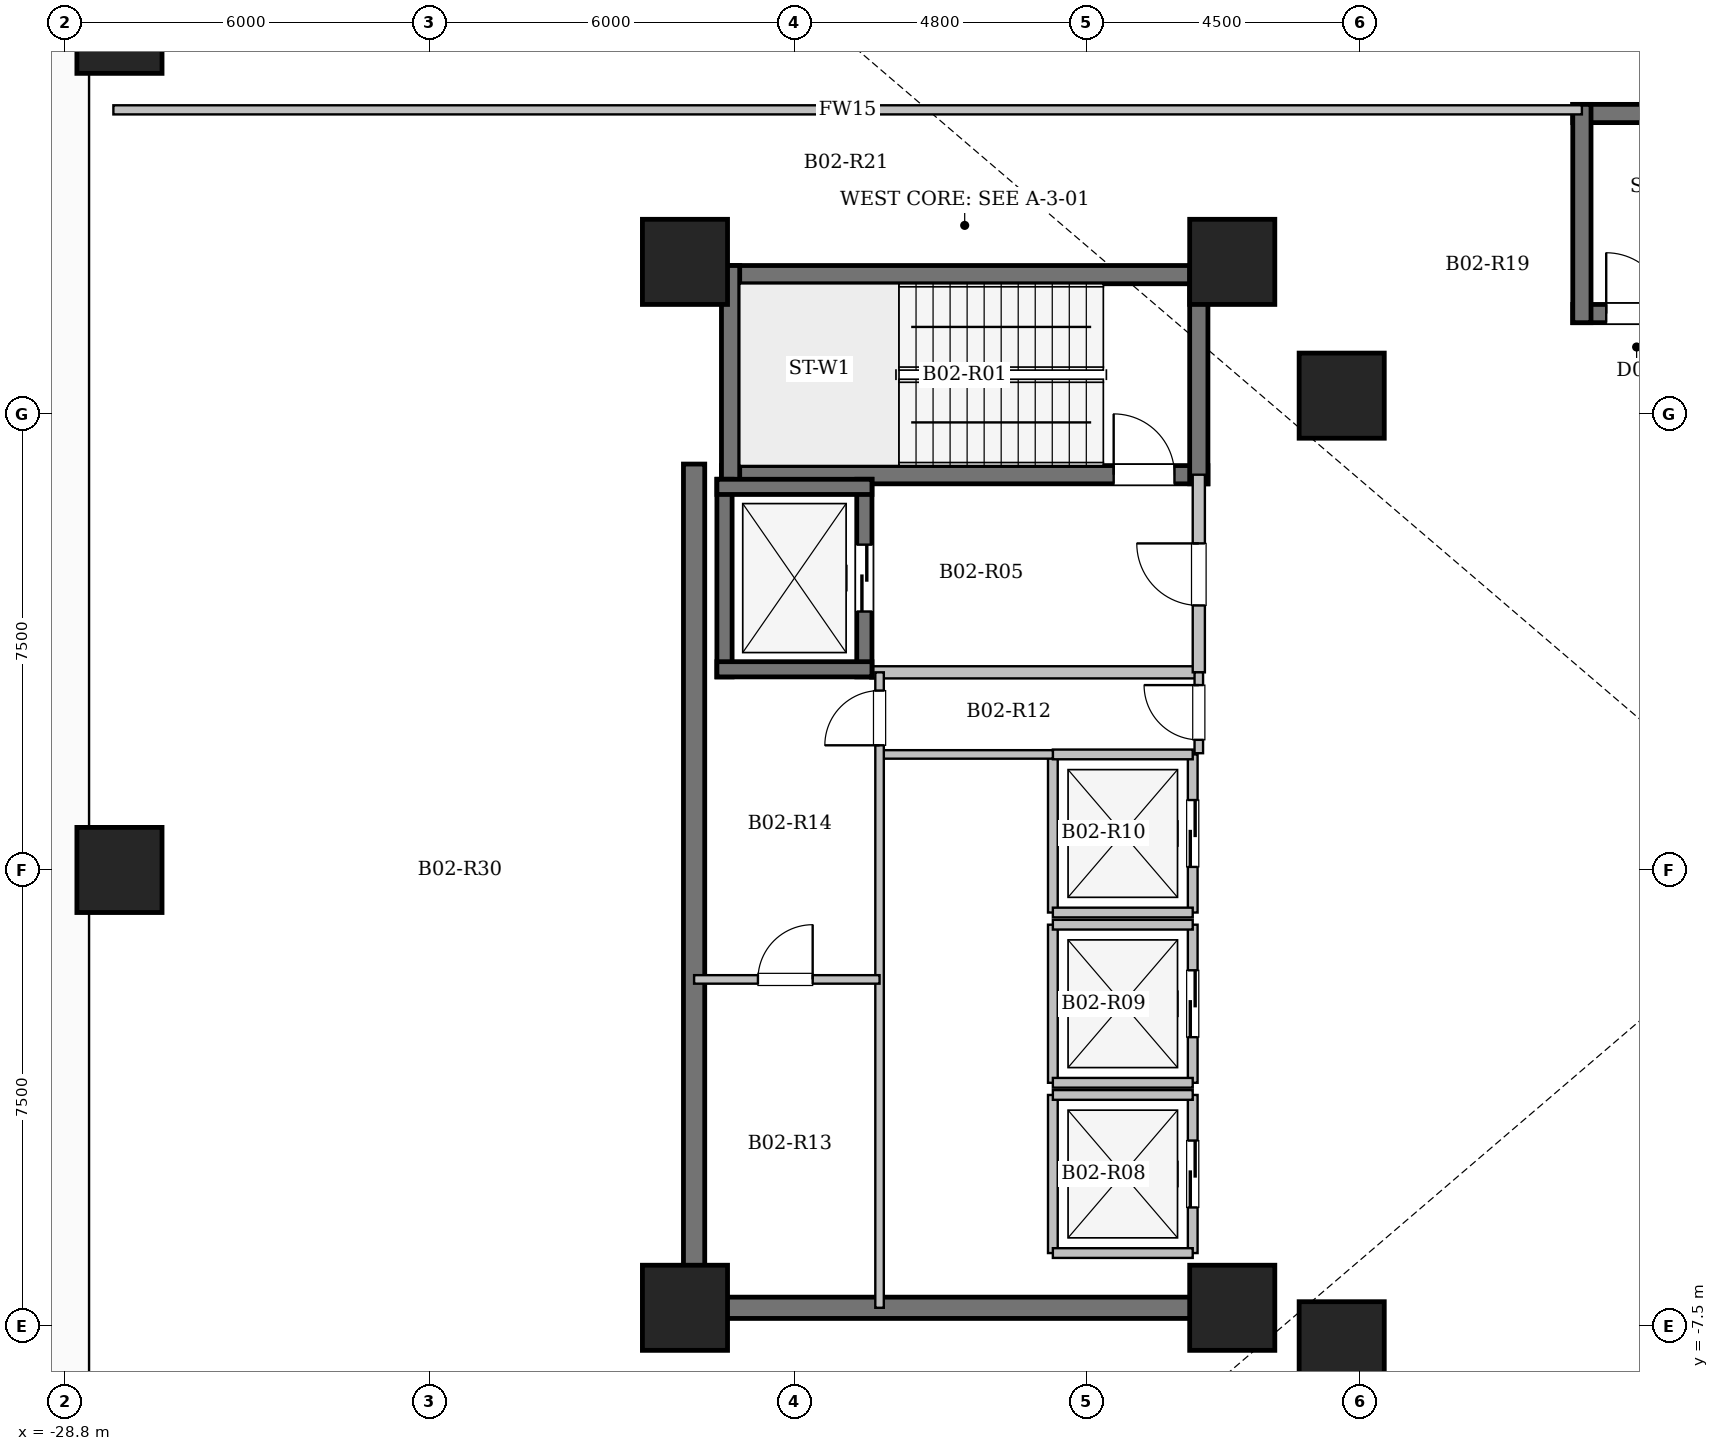
"""IFC4 building model, lengths in metres.
Left out: names, types, materials, properties, quantities, classifications, styles, units other than length and angle.
Written with IfcOpenShell. Run it as: python <this file> out.ifc"""

import sys

from ifc_helpers import new_model, si_unit, direction, frame, frame_2d, origin, origin_2d, place, context, subcontext, project, spatial, rectangle, extrude, element, fill, save


model = new_model("IFC4")
c1 = context("Model", 3, precision=1e-05, world=origin(), true_north=direction((0.0, 1.0)))
c2 = subcontext(c1, "Body", "Model", "MODEL_VIEW")
j1 = project(units=[si_unit("LENGTHUNIT", "METRE"), si_unit("PLANEANGLEUNIT", "RADIAN")], contexts=[c1])
p1 = place(None, origin())
s1 = spatial("IfcSite", under=j1, at=p1, CompositionType="ELEMENT")
p2 = place(p1, origin())
s2 = spatial("IfcBuilding", under=s1, at=p2, CompositionType="ELEMENT")
p3 = place(p2, frame((0.0, 0.0, -9.2)))
s3 = spatial("IfcBuildingStorey", under=s2, at=p3, CompositionType="ELEMENT", Elevation=-9.2)
for number, where, z_axis, x_axis in (
    (1, (-7.8, -7.8, 0.0), (0.0, 0.0, 1.0), (1.0, 0.0, 0.0)),
    (2, (-7.8, 7.8, 0.0), (0.0, 0.0, 1.0), (1.0, 0.0, 0.0)),
    (3, (-9.6, -7.2, 0.0), (0.0, 0.0, 1.0), (1.0, 0.0, 0.0)),
    (4, (-9.6, 10.0, 0.0), (0.0, 0.0, 1.0), (1.0, 0.0, 0.0)),
    (5, (-18.6, -7.2, 0.0), (0.0, 0.0, 1.0), (1.0, 0.0, 0.0)),
    (6, (-18.6, 10.0, 0.0), (0.0, 0.0, 1.0), (1.0, 0.0, 0.0)),
    (7, (-27.9, 0.0, 0.0), (0.0, 0.0, 1.0), (1.0, 0.0, 0.0)),
    (8, (-27.9, 13.8, 0.0), (0.0, 0.0, 1.0), (1.0, 0.0, 0.0)),
):
    element("IfcColumn", number, at=place(p3, frame(where, z_axis=z_axis, x_axis=x_axis)), inside=s3, PredefinedType="COLUMN", context=c2, shape_type="SweptSolid", body=[
        extrude(rectangle(XDim=1.4, YDim=1.4, at=origin_2d()), origin(), (0.0, 0.0, 1.0), 4.6),
    ])
p4 = place(p3, frame((-18.0, 9.79, 0.0), z_axis=(0.0, 0.0, 1.0), x_axis=(1.0, 0.0, 0.0)))
e9 = element("IfcWall", 9, at=p4, inside=s3, PredefinedType="SHEAR", context=c2, shape_type="SweptSolid", body=[
    extrude(rectangle(XDim=8.0, YDim=0.3, at=frame_2d((4.0, 0.0))), origin(), (0.0, 0.0, 1.0), 4.6),
])
p5 = place(p3, frame((-18.0, 6.5, 0.0), z_axis=(0.0, 0.0, 1.0), x_axis=(1.0, 0.0, 0.0)))
e10 = element("IfcWall", 10, at=p5, inside=s3, PredefinedType="SHEAR", context=c2, shape_type="SweptSolid", body=[
    extrude(rectangle(XDim=8.0, YDim=0.3, at=frame_2d((4.0, 0.0))), origin(), (0.0, 0.0, 1.0), 4.6),
])
p6 = place(p5, frame((6.45, 0.0, 0.0)))
e11 = element("IfcOpeningElement", 11, at=p6, cuts=e10, PredefinedType="OPENING", context=c2, shape_type="SweptSolid", body=[
    extrude(rectangle(XDim=1.0, YDim=2.15, at=frame_2d((0.5, 1.075))), frame((0.0, 0.16, 0.0), z_axis=(0.0, -1.0, 0.0), x_axis=(1.0, 0.0, 0.0)), (0.0, 0.0, 1.0), 0.32),
])
for number, where, z_axis, x_axis in (
    (12, (-17.85, 6.35, 0.0), (0.0, 0.0, 1.0), (0.0, 1.0, 0.0)),
    (13, (-10.15, 6.35, 0.0), (0.0, 0.0, 1.0), (0.0, 1.0, 0.0)),
):
    element("IfcWall", number, at=place(p3, frame(where, z_axis=z_axis, x_axis=x_axis)), inside=s3, PredefinedType="SHEAR", context=c2, shape_type="SweptSolid", body=[
        extrude(rectangle(XDim=3.59, YDim=0.3, at=frame_2d((1.795, 0.0))), origin(), (0.0, 0.0, 1.0), 4.6),
    ])
p7 = place(p3, frame((-4.0, 12.44, 0.0), z_axis=(0.0, 0.0, 1.0), x_axis=(1.0, 0.0, 0.0)))
e14 = element("IfcWall", 14, at=p7, inside=s3, PredefinedType="SHEAR", context=c2, shape_type="SweptSolid", body=[
    extrude(rectangle(XDim=8.0, YDim=0.3, at=frame_2d((4.0, 0.0))), origin(), (0.0, 0.0, 1.0), 4.6),
])
p8 = place(p3, frame((-4.0, 9.15, 0.0), z_axis=(0.0, 0.0, 1.0), x_axis=(1.0, 0.0, 0.0)))
e15 = element("IfcWall", 15, at=p8, inside=s3, PredefinedType="SHEAR", context=c2, shape_type="SweptSolid", body=[
    extrude(rectangle(XDim=8.0, YDim=0.3, at=frame_2d((4.0, 0.0))), origin(), (0.0, 0.0, 1.0), 4.6),
])
p9 = place(p8, frame((0.55, 0.0, 0.0)))
e16 = element("IfcOpeningElement", 16, at=p9, cuts=e15, PredefinedType="OPENING", context=c2, shape_type="SweptSolid", body=[
    extrude(rectangle(XDim=1.0, YDim=2.15, at=frame_2d((0.5, 1.075))), frame((0.0, 0.16, 0.0), z_axis=(0.0, -1.0, 0.0), x_axis=(1.0, 0.0, 0.0)), (0.0, 0.0, 1.0), 0.32),
])
p10 = place(p3, frame((-3.85, 9.0, 0.0), z_axis=(0.0, 0.0, 1.0), x_axis=(0.0, 1.0, 0.0)))
e17 = element("IfcWall", 17, at=p10, inside=s3, PredefinedType="SHEAR", context=c2, shape_type="SweptSolid", body=[
    extrude(rectangle(XDim=3.59, YDim=0.3, at=frame_2d((1.795, 0.0))), origin(), (0.0, 0.0, 1.0), 4.6),
])
p11 = place(p3, frame((-15.55, 3.25, 0.0), z_axis=(0.0, 0.0, 1.0), x_axis=(1.0, 0.0, 0.0)))
e18 = element("IfcWall", 18, at=p11, inside=s3, PredefinedType="SOLIDWALL", context=c2, shape_type="SweptSolid", body=[
    extrude(rectangle(XDim=5.4, YDim=0.2, at=frame_2d((2.7, 0.0))), origin(), (0.0, 0.0, 1.0), 4.3),
])
p12 = place(p3, frame((-10.15, 3.25, 0.0), z_axis=(0.0, 0.0, 1.0), x_axis=(0.0, 1.0, 0.0)))
e19 = element("IfcWall", 19, at=p12, inside=s3, PredefinedType="SOLIDWALL", context=c2, shape_type="SweptSolid", body=[
    extrude(rectangle(XDim=3.25, YDim=0.2, at=frame_2d((1.625, 0.0))), origin(), (0.0, 0.0, 1.0), 4.3),
])
p13 = place(p12, frame((1.1, 0.0, 0.0)))
e20 = element("IfcOpeningElement", 20, at=p13, cuts=e19, PredefinedType="OPENING", context=c2, shape_type="SweptSolid", body=[
    extrude(rectangle(XDim=1.02, YDim=2.15, at=frame_2d((0.51, 1.075))), frame((0.0, 0.11, 0.0), z_axis=(0.0, -1.0, 0.0), x_axis=(1.0, 0.0, 0.0)), (0.0, 0.0, 1.0), 0.22),
])
p14 = place(p3, frame((-17.95, 3.175, 0.0), z_axis=(0.0, 0.0, 1.0), x_axis=(0.0, 1.0, 0.0)))
e21 = element("IfcWall", 21, at=p14, inside=s3, PredefinedType="SHEAR", context=c2, shape_type="SweptSolid", body=[
    extrude(rectangle(XDim=3.25, YDim=0.25, at=frame_2d((1.625, 0.0))), origin(), (0.0, 0.0, 1.0), 4.6),
])
p15 = place(p3, frame((-15.65, 3.175, 0.0), z_axis=(0.0, 0.0, 1.0), x_axis=(0.0, 1.0, 0.0)))
e22 = element("IfcWall", 22, at=p15, inside=s3, PredefinedType="SHEAR", context=c2, shape_type="SweptSolid", body=[
    extrude(rectangle(XDim=3.25, YDim=0.25, at=frame_2d((1.625, 0.0))), origin(), (0.0, 0.0, 1.0), 4.6),
])
p16 = place(p15, frame((1.075, 0.0, 0.0)))
e23 = element("IfcOpeningElement", 23, at=p16, cuts=e22, PredefinedType="OPENING", context=c2, shape_type="SweptSolid", body=[
    extrude(rectangle(XDim=1.1, YDim=2.15, at=frame_2d((0.55, 1.075))), frame((0.0, 0.135, 0.0), z_axis=(0.0, -1.0, 0.0), x_axis=(1.0, 0.0, 0.0)), (0.0, 0.0, 1.0), 0.27),
])
for number, where, z_axis, x_axis in (
    (24, (-18.075, 3.3, 0.0), (0.0, 0.0, 1.0), (1.0, 0.0, 0.0)),
    (25, (-18.075, 6.3, 0.0), (0.0, 0.0, 1.0), (1.0, 0.0, 0.0)),
):
    element("IfcWall", number, at=place(p3, frame(where, z_axis=z_axis, x_axis=x_axis)), inside=s3, PredefinedType="SHEAR", context=c2, shape_type="SweptSolid", body=[
        extrude(rectangle(XDim=2.55, YDim=0.25, at=frame_2d((1.275, 0.0))), origin(), (0.0, 0.0, 1.0), 4.6),
    ])
p17 = place(p3, frame((-12.55, -6.3, 0.0), z_axis=(0.0, 0.0, 1.0), x_axis=(0.0, 1.0, 0.0)))
e26 = element("IfcWall", 26, at=p17, inside=s3, PredefinedType="SOLIDWALL", context=c2, shape_type="SweptSolid", body=[
    extrude(rectangle(XDim=2.6, YDim=0.16, at=frame_2d((1.3, 0.0))), origin(), (0.0, 0.0, 1.0), 4.3),
])
p18 = place(p3, frame((-10.25, -6.3, 0.0), z_axis=(0.0, 0.0, 1.0), x_axis=(0.0, 1.0, 0.0)))
e27 = element("IfcWall", 27, at=p18, inside=s3, PredefinedType="SOLIDWALL", context=c2, shape_type="SweptSolid", body=[
    extrude(rectangle(XDim=2.6, YDim=0.16, at=frame_2d((1.3, 0.0))), origin(), (0.0, 0.0, 1.0), 4.3),
])
p19 = place(p18, frame((0.75, 0.0, 0.0)))
e28 = element("IfcOpeningElement", 28, at=p19, cuts=e27, PredefinedType="OPENING", context=c2, shape_type="SweptSolid", body=[
    extrude(rectangle(XDim=1.1, YDim=2.15, at=frame_2d((0.55, 1.075))), frame((0.0, 0.09, 0.0), z_axis=(0.0, -1.0, 0.0), x_axis=(1.0, 0.0, 0.0)), (0.0, 0.0, 1.0), 0.18),
])
for number, where, z_axis, x_axis in (
    (29, (-12.55, -6.3, 0.0), (0.0, 0.0, 1.0), (1.0, 0.0, 0.0)),
    (30, (-12.55, -3.7, 0.0), (0.0, 0.0, 1.0), (1.0, 0.0, 0.0)),
):
    element("IfcWall", number, at=place(p3, frame(where, z_axis=z_axis, x_axis=x_axis)), inside=s3, PredefinedType="SOLIDWALL", context=c2, shape_type="SweptSolid", body=[
        extrude(rectangle(XDim=2.3, YDim=0.16, at=frame_2d((1.15, 0.0))), origin(), (0.0, 0.0, 1.0), 4.3),
    ])
p20 = place(p3, frame((-12.55, -3.5, 0.0), z_axis=(0.0, 0.0, 1.0), x_axis=(0.0, 1.0, 0.0)))
e31 = element("IfcWall", 31, at=p20, inside=s3, PredefinedType="SOLIDWALL", context=c2, shape_type="SweptSolid", body=[
    extrude(rectangle(XDim=2.6, YDim=0.16, at=frame_2d((1.3, 0.0))), origin(), (0.0, 0.0, 1.0), 4.3),
])
p21 = place(p3, frame((-10.25, -3.5, 0.0), z_axis=(0.0, 0.0, 1.0), x_axis=(0.0, 1.0, 0.0)))
e32 = element("IfcWall", 32, at=p21, inside=s3, PredefinedType="SOLIDWALL", context=c2, shape_type="SweptSolid", body=[
    extrude(rectangle(XDim=2.6, YDim=0.16, at=frame_2d((1.3, 0.0))), origin(), (0.0, 0.0, 1.0), 4.3),
])
p22 = place(p21, frame((0.75, 0.0, 0.0)))
e33 = element("IfcOpeningElement", 33, at=p22, cuts=e32, PredefinedType="OPENING", context=c2, shape_type="SweptSolid", body=[
    extrude(rectangle(XDim=1.1, YDim=2.15, at=frame_2d((0.55, 1.075))), frame((0.0, 0.09, 0.0), z_axis=(0.0, -1.0, 0.0), x_axis=(1.0, 0.0, 0.0)), (0.0, 0.0, 1.0), 0.18),
])
for number, where, z_axis, x_axis in (
    (34, (-12.55, -3.5, 0.0), (0.0, 0.0, 1.0), (1.0, 0.0, 0.0)),
    (35, (-12.55, -0.9, 0.0), (0.0, 0.0, 1.0), (1.0, 0.0, 0.0)),
):
    element("IfcWall", number, at=place(p3, frame(where, z_axis=z_axis, x_axis=x_axis)), inside=s3, PredefinedType="SOLIDWALL", context=c2, shape_type="SweptSolid", body=[
        extrude(rectangle(XDim=2.3, YDim=0.16, at=frame_2d((1.15, 0.0))), origin(), (0.0, 0.0, 1.0), 4.3),
    ])
p23 = place(p3, frame((-12.55, -0.7, 0.0), z_axis=(0.0, 0.0, 1.0), x_axis=(0.0, 1.0, 0.0)))
e36 = element("IfcWall", 36, at=p23, inside=s3, PredefinedType="SOLIDWALL", context=c2, shape_type="SweptSolid", body=[
    extrude(rectangle(XDim=2.6, YDim=0.16, at=frame_2d((1.3, 0.0))), origin(), (0.0, 0.0, 1.0), 4.3),
])
p24 = place(p3, frame((-10.25, -0.7, 0.0), z_axis=(0.0, 0.0, 1.0), x_axis=(0.0, 1.0, 0.0)))
e37 = element("IfcWall", 37, at=p24, inside=s3, PredefinedType="SOLIDWALL", context=c2, shape_type="SweptSolid", body=[
    extrude(rectangle(XDim=2.6, YDim=0.16, at=frame_2d((1.3, 0.0))), origin(), (0.0, 0.0, 1.0), 4.3),
])
p25 = place(p24, frame((0.75, 0.0, 0.0)))
e38 = element("IfcOpeningElement", 38, at=p25, cuts=e37, PredefinedType="OPENING", context=c2, shape_type="SweptSolid", body=[
    extrude(rectangle(XDim=1.1, YDim=2.15, at=frame_2d((0.55, 1.075))), frame((0.0, 0.09, 0.0), z_axis=(0.0, -1.0, 0.0), x_axis=(1.0, 0.0, 0.0)), (0.0, 0.0, 1.0), 0.18),
])
for number, where, z_axis, x_axis in (
    (39, (-12.55, -0.7, 0.0), (0.0, 0.0, 1.0), (1.0, 0.0, 0.0)),
    (40, (-12.55, 1.9, 0.0), (0.0, 0.0, 1.0), (1.0, 0.0, 0.0)),
):
    element("IfcWall", number, at=place(p3, frame(where, z_axis=z_axis, x_axis=x_axis)), inside=s3, PredefinedType="SOLIDWALL", context=c2, shape_type="SweptSolid", body=[
        extrude(rectangle(XDim=2.3, YDim=0.16, at=frame_2d((1.15, 0.0))), origin(), (0.0, 0.0, 1.0), 4.3),
    ])
p26 = place(p3, frame((-18.45, -7.375, 0.0), z_axis=(0.0, 0.0, 1.0), x_axis=(0.0, 1.0, 0.0)))
e41 = element("IfcWall", 41, at=p26, inside=s3, PredefinedType="SHEAR", context=c2, shape_type="SweptSolid", body=[
    extrude(rectangle(XDim=14.05, YDim=0.35, at=frame_2d((7.025, 0.0))), origin(), (0.0, 0.0, 1.0), 4.6),
])
p27 = place(p3, frame((-18.625, -7.2, 0.0), z_axis=(0.0, 0.0, 1.0), x_axis=(1.0, 0.0, 0.0)))
e42 = element("IfcWall", 42, at=p27, inside=s3, PredefinedType="SHEAR", context=c2, shape_type="SweptSolid", body=[
    extrude(rectangle(XDim=8.55, YDim=0.35, at=frame_2d((4.275, 0.0))), origin(), (0.0, 0.0, 1.0), 4.6),
])
p28 = place(p3, frame((-15.4, 1.9, 0.0), z_axis=(0.0, 0.0, 1.0), x_axis=(1.0, 0.0, 0.0)))
e43 = element("IfcWall", 43, at=p28, inside=s3, PredefinedType="PARTITIONING", context=c2, shape_type="SweptSolid", body=[
    extrude(rectangle(XDim=2.85, YDim=0.14, at=frame_2d((1.425, 0.0))), origin(), (0.0, 0.0, 1.0), 4.3),
])
p29 = place(p3, frame((-10.15, 1.92, 0.0), z_axis=(0.0, 0.0, 1.0), x_axis=(0.0, 1.0, 0.0)))
e44 = element("IfcWall", 44, at=p29, inside=s3, PredefinedType="PARTITIONING", context=c2, shape_type="SweptSolid", body=[
    extrude(rectangle(XDim=1.33, YDim=0.14, at=frame_2d((0.665, 0.0))), origin(), (0.0, 0.0, 1.0), 4.3),
])
p30 = place(p29, frame((0.22, 0.0, 0.0)))
e45 = element("IfcOpeningElement", 45, at=p30, cuts=e44, PredefinedType="OPENING", context=c2, shape_type="SweptSolid", body=[
    extrude(rectangle(XDim=0.9, YDim=2.08, at=frame_2d((0.45, 1.04))), frame((0.0, 0.08, 0.0), z_axis=(0.0, -1.0, 0.0), x_axis=(1.0, 0.0, 0.0)), (0.0, 0.0, 1.0), 0.16),
])
p31 = place(p3, frame((-15.4, -7.2, 0.0), z_axis=(0.0, 0.0, 1.0), x_axis=(0.0, 1.0, 0.0)))
e46 = element("IfcWall", 46, at=p31, inside=s3, PredefinedType="PARTITIONING", context=c2, shape_type="SweptSolid", body=[
    extrude(rectangle(XDim=10.45, YDim=0.14, at=frame_2d((5.225, 0.0))), origin(), (0.0, 0.0, 1.0), 4.3),
])
p32 = place(p31, frame((9.25, 0.0, 0.0)))
e47 = element("IfcOpeningElement", 47, at=p32, cuts=e46, PredefinedType="OPENING", context=c2, shape_type="SweptSolid", body=[
    extrude(rectangle(XDim=0.9, YDim=2.08, at=frame_2d((0.45, 1.04))), frame((0.0, 0.08, 0.0), z_axis=(0.0, -1.0, 0.0), x_axis=(1.0, 0.0, 0.0)), (0.0, 0.0, 1.0), 0.16),
])
p33 = place(p3, frame((-18.45, -1.8, 0.0), z_axis=(0.0, 0.0, 1.0), x_axis=(1.0, 0.0, 0.0)))
e48 = element("IfcWall", 48, at=p33, inside=s3, PredefinedType="PARTITIONING", context=c2, shape_type="SweptSolid", body=[
    extrude(rectangle(XDim=3.05, YDim=0.14, at=frame_2d((1.525, 0.0))), origin(), (0.0, 0.0, 1.0), 4.3),
])
p34 = place(p33, frame((1.05, 0.0, 0.0)))
e49 = element("IfcOpeningElement", 49, at=p34, cuts=e48, PredefinedType="OPENING", context=c2, shape_type="SweptSolid", body=[
    extrude(rectangle(XDim=0.9, YDim=2.08, at=frame_2d((0.45, 1.04))), frame((0.0, 0.08, 0.0), z_axis=(0.0, -1.0, 0.0), x_axis=(1.0, 0.0, 0.0)), (0.0, 0.0, 1.0), 0.16),
])
p35 = place(p3, frame((-28.0, 12.5, 0.0), z_axis=(0.0, 0.0, 1.0), x_axis=(1.0, 0.0, 0.0)))
e50 = element("IfcWall", 50, at=p35, inside=s3, PredefinedType="PARTITIONING", context=c2, shape_type="SweptSolid", body=[
    extrude(rectangle(XDim=24.15, YDim=0.15, at=frame_2d((12.075, 0.0))), origin(), (0.0, 0.0, 1.0), 4.3),
])
p36 = place(p6, origin())
e51 = element("IfcDoor", 51, at=p36, inside=s3, OperationType="SINGLE_SWING_LEFT", PredefinedType="DOOR", context=c2, shape_type="SweptSolid", body=[
    extrude(rectangle(XDim=1.0, YDim=2.15, at=frame_2d((0.5, 1.075))), frame((0.0, 0.025, 0.0), z_axis=(0.0, -1.0, 0.0), x_axis=(1.0, 0.0, 0.0)), (0.0, 0.0, 1.0), 0.05),
])
fill(e11, e51)
p37 = place(p9, origin())
e52 = element("IfcDoor", 52, at=p37, inside=s3, OperationType="SINGLE_SWING_LEFT", PredefinedType="DOOR", context=c2, shape_type="SweptSolid", body=[
    extrude(rectangle(XDim=1.0, YDim=2.15, at=frame_2d((0.5, 1.075))), frame((0.0, 0.025, 0.0), z_axis=(0.0, -1.0, 0.0), x_axis=(1.0, 0.0, 0.0)), (0.0, 0.0, 1.0), 0.05),
])
fill(e16, e52)
p38 = place(p13, origin())
e53 = element("IfcDoor", 53, at=p38, inside=s3, OperationType="SINGLE_SWING_RIGHT", PredefinedType="DOOR", context=c2, shape_type="SweptSolid", body=[
    extrude(rectangle(XDim=1.02, YDim=2.15, at=frame_2d((0.51, 1.075))), frame((0.0, 0.025, 0.0), z_axis=(0.0, -1.0, 0.0), x_axis=(1.0, 0.0, 0.0)), (0.0, 0.0, 1.0), 0.05),
])
fill(e20, e53)
p39 = place(p16, origin())
e54 = element("IfcDoor", 54, at=p39, inside=s3, OperationType="SLIDING_TO_LEFT", PredefinedType="DOOR", context=c2, shape_type="SweptSolid", body=[
    extrude(rectangle(XDim=1.1, YDim=2.15, at=frame_2d((0.55, 1.075))), frame((0.0, 0.025, 0.0), z_axis=(0.0, -1.0, 0.0), x_axis=(1.0, 0.0, 0.0)), (0.0, 0.0, 1.0), 0.05),
])
fill(e23, e54)
p40 = place(p19, origin())
e55 = element("IfcDoor", 55, at=p40, inside=s3, OperationType="SLIDING_TO_LEFT", PredefinedType="DOOR", context=c2, shape_type="SweptSolid", body=[
    extrude(rectangle(XDim=1.1, YDim=2.15, at=frame_2d((0.55, 1.075))), frame((0.0, 0.025, 0.0), z_axis=(0.0, -1.0, 0.0), x_axis=(1.0, 0.0, 0.0)), (0.0, 0.0, 1.0), 0.05),
])
fill(e28, e55)
p41 = place(p22, origin())
e56 = element("IfcDoor", 56, at=p41, inside=s3, OperationType="SLIDING_TO_LEFT", PredefinedType="DOOR", context=c2, shape_type="SweptSolid", body=[
    extrude(rectangle(XDim=1.1, YDim=2.15, at=frame_2d((0.55, 1.075))), frame((0.0, 0.025, 0.0), z_axis=(0.0, -1.0, 0.0), x_axis=(1.0, 0.0, 0.0)), (0.0, 0.0, 1.0), 0.05),
])
fill(e33, e56)
p42 = place(p25, origin())
e57 = element("IfcDoor", 57, at=p42, inside=s3, OperationType="SLIDING_TO_LEFT", PredefinedType="DOOR", context=c2, shape_type="SweptSolid", body=[
    extrude(rectangle(XDim=1.1, YDim=2.15, at=frame_2d((0.55, 1.075))), frame((0.0, 0.025, 0.0), z_axis=(0.0, -1.0, 0.0), x_axis=(1.0, 0.0, 0.0)), (0.0, 0.0, 1.0), 0.05),
])
fill(e38, e57)
p43 = place(p30, origin())
e58 = element("IfcDoor", 58, at=p43, inside=s3, OperationType="SINGLE_SWING_RIGHT", PredefinedType="DOOR", context=c2, shape_type="SweptSolid", body=[
    extrude(rectangle(XDim=0.9, YDim=2.08, at=frame_2d((0.45, 1.04))), frame((0.0, 0.025, 0.0), z_axis=(0.0, -1.0, 0.0), x_axis=(1.0, 0.0, 0.0)), (0.0, 0.0, 1.0), 0.05),
])
fill(e45, e58)
p44 = place(p32, origin())
e59 = element("IfcDoor", 59, at=p44, inside=s3, OperationType="SINGLE_SWING_LEFT", PredefinedType="DOOR", context=c2, shape_type="SweptSolid", body=[
    extrude(rectangle(XDim=0.9, YDim=2.08, at=frame_2d((0.45, 1.04))), frame((0.0, 0.025, 0.0), z_axis=(0.0, -1.0, 0.0), x_axis=(1.0, 0.0, 0.0)), (0.0, 0.0, 1.0), 0.05),
])
fill(e47, e59)
p45 = place(p34, origin())
e60 = element("IfcDoor", 60, at=p45, inside=s3, OperationType="SINGLE_SWING_RIGHT", PredefinedType="DOOR", context=c2, shape_type="SweptSolid", body=[
    extrude(rectangle(XDim=0.9, YDim=2.08, at=frame_2d((0.45, 1.04))), frame((0.0, 0.025, 0.0), z_axis=(0.0, -1.0, 0.0), x_axis=(1.0, 0.0, 0.0)), (0.0, 0.0, 1.0), 0.05),
])
fill(e49, e60)
save(model, sys.argv[1])
